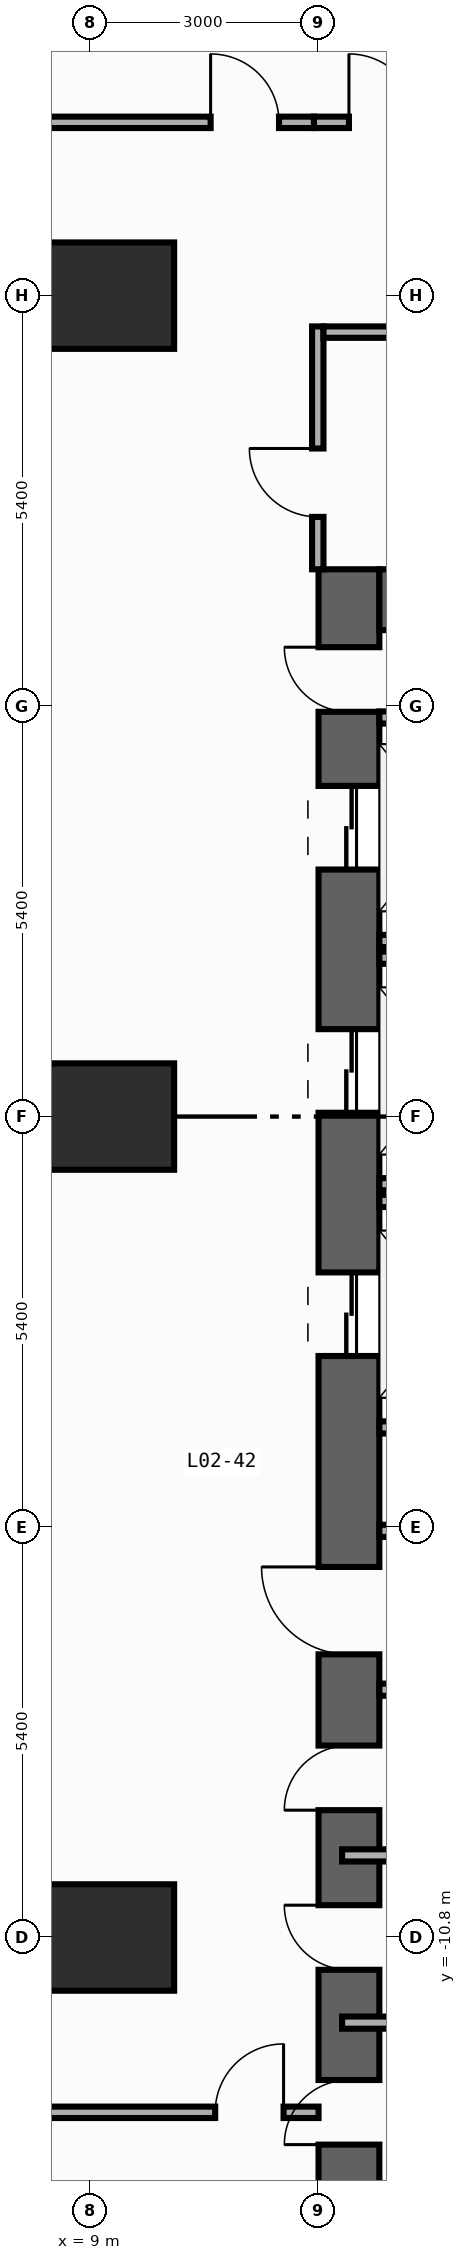
"""IFC4 building model, lengths in metres.
Left out: names, types, materials, properties, quantities, classifications, styles, units other than length and angle.
Written with IfcOpenShell. Run it as: python <this file> out.ifc"""

import sys

from ifc_helpers import new_model, si_unit, direction, frame, frame_2d, origin, origin_2d, place, context, subcontext, project, spatial, rectangle, extrude, element, fill, save


model = new_model("IFC4")
c1 = context("Model", 3, precision=1e-05, world=origin(), true_north=direction((0.0, 1.0)))
c2 = subcontext(c1, "Body", "Model", "MODEL_VIEW")
j1 = project(units=[si_unit("LENGTHUNIT", "METRE"), si_unit("PLANEANGLEUNIT", "RADIAN")], contexts=[c1])
p1 = place(None, origin())
s1 = spatial("IfcSite", under=j1, at=p1, CompositionType="ELEMENT")
p2 = place(p1, origin())
s2 = spatial("IfcBuilding", under=s1, at=p2, CompositionType="ELEMENT")
p3 = place(p2, frame((0.0, 0.0, 6.0)))
s3 = spatial("IfcBuildingStorey", under=s2, at=p3, CompositionType="ELEMENT", Elevation=6.0)
p4 = place(p3, frame((12.4, -19.8, 0.0), z_axis=(0.0, 0.0, 1.0), x_axis=(0.0, 1.0, 0.0)))
e1 = element("IfcWall", 1, at=p4, inside=s3, PredefinedType="SHEAR", context=c2, shape_type="SweptSolid", body=[
    extrude(rectangle(XDim=27.0, YDim=0.8, at=frame_2d((13.5, 0.0))), origin(), (0.0, 0.0, 1.0), 4.7),
])
p5 = place(p4, frame((23.05, 0.0, 0.0)))
e2 = element("IfcOpeningElement", 2, at=p5, cuts=e1, PredefinedType="OPENING", context=c2, shape_type="SweptSolid", body=[
    extrude(rectangle(XDim=1.1, YDim=2.2, at=frame_2d((0.55, 1.1))), frame((0.0, 0.41, 0.0), z_axis=(0.0, -1.0, 0.0), x_axis=(1.0, 0.0, 0.0)), (0.0, 0.0, 1.0), 0.82),
])
p6 = place(p4, frame((19.85, 0.0, 0.0)))
e3 = element("IfcOpeningElement", 3, at=p6, cuts=e1, PredefinedType="OPENING", context=c2, shape_type="SweptSolid", body=[
    extrude(rectangle(XDim=1.1, YDim=2.2, at=frame_2d((0.55, 1.1))), frame((0.0, 0.41, 0.0), z_axis=(0.0, -1.0, 0.0), x_axis=(1.0, 0.0, 0.0)), (0.0, 0.0, 1.0), 0.82),
])
p7 = place(p4, frame((16.65, 0.0, 0.0)))
e4 = element("IfcOpeningElement", 4, at=p7, cuts=e1, PredefinedType="OPENING", context=c2, shape_type="SweptSolid", body=[
    extrude(rectangle(XDim=1.1, YDim=2.2, at=frame_2d((0.55, 1.1))), frame((0.0, 0.41, 0.0), z_axis=(0.0, -1.0, 0.0), x_axis=(1.0, 0.0, 0.0)), (0.0, 0.0, 1.0), 0.82),
])
p8 = place(p4, frame((6.275, 0.0, 0.0)))
e5 = element("IfcOpeningElement", 5, at=p8, cuts=e1, PredefinedType="OPENING", context=c2, shape_type="SweptSolid", body=[
    extrude(rectangle(XDim=0.85, YDim=2.1, at=frame_2d((0.425, 1.05))), frame((0.0, 0.41, 0.0), z_axis=(0.0, -1.0, 0.0), x_axis=(1.0, 0.0, 0.0)), (0.0, 0.0, 1.0), 0.82),
])
p9 = place(p4, frame((8.575, 0.0, 0.0)))
e6 = element("IfcOpeningElement", 6, at=p9, cuts=e1, PredefinedType="OPENING", context=c2, shape_type="SweptSolid", body=[
    extrude(rectangle(XDim=0.85, YDim=2.1, at=frame_2d((0.425, 1.05))), frame((0.0, 0.41, 0.0), z_axis=(0.0, -1.0, 0.0), x_axis=(1.0, 0.0, 0.0)), (0.0, 0.0, 1.0), 0.82),
])
p10 = place(p4, frame((10.675, 0.0, 0.0)))
e7 = element("IfcOpeningElement", 7, at=p10, cuts=e1, PredefinedType="OPENING", context=c2, shape_type="SweptSolid", body=[
    extrude(rectangle(XDim=0.85, YDim=2.1, at=frame_2d((0.425, 1.05))), frame((0.0, 0.41, 0.0), z_axis=(0.0, -1.0, 0.0), x_axis=(1.0, 0.0, 0.0)), (0.0, 0.0, 1.0), 0.82),
])
p11 = place(p4, frame((12.725, 0.0, 0.0)))
e8 = element("IfcOpeningElement", 8, at=p11, cuts=e1, PredefinedType="OPENING", context=c2, shape_type="SweptSolid", body=[
    extrude(rectangle(XDim=1.15, YDim=2.2, at=frame_2d((0.575, 1.1))), frame((0.0, 0.41, 0.0), z_axis=(0.0, -1.0, 0.0), x_axis=(1.0, 0.0, 0.0)), (0.0, 0.0, 1.0), 0.82),
])
p12 = place(p4, frame((25.125, 0.0, 0.0)))
e9 = element("IfcOpeningElement", 9, at=p12, cuts=e1, PredefinedType="OPENING", context=c2, shape_type="SweptSolid", body=[
    extrude(rectangle(XDim=0.85, YDim=2.1, at=frame_2d((0.425, 1.05))), frame((0.0, 0.41, 0.0), z_axis=(0.0, -1.0, 0.0), x_axis=(1.0, 0.0, 0.0)), (0.0, 0.0, 1.0), 0.82),
])
p13 = place(p3, frame((12.8, 6.8, 0.0), z_axis=(0.0, 0.0, 1.0), x_axis=(1.0, 0.0, 0.0)))
e10 = element("IfcWall", 10, at=p13, inside=s3, PredefinedType="SHEAR", context=c2, shape_type="SweptSolid", body=[
    extrude(rectangle(XDim=6.8, YDim=0.8, at=frame_2d((3.4, 0.0))), origin(), (0.0, 0.0, 1.0), 4.7),
])
for number, where, z_axis, x_axis in (
    (11, (9.2, -10.8, 0.0), (0.0, 0.0, 1.0), (1.0, 0.0, 0.0)),
    (12, (9.2, 0.0, 0.0), (0.0, 0.0, 1.0), (1.0, 0.0, 0.0)),
    (13, (9.2, 10.8, 0.0), (0.0, 0.0, 1.0), (1.0, 0.0, 0.0)),
):
    element("IfcColumn", number, at=place(p3, frame(where, z_axis=z_axis, x_axis=x_axis)), inside=s3, PredefinedType="COLUMN", context=c2, shape_type="SweptSolid", body=[
        extrude(rectangle(XDim=1.8, YDim=1.4, at=origin_2d()), origin(), (0.0, 0.0, 1.0), 5.0),
    ])
for number, where, z_axis, x_axis in (
    (14, (12.8, 2.31, 0.0), (0.0, 0.0, 1.0), (1.0, 0.0, 0.0)),
    (15, (12.8, -0.89, 0.0), (0.0, 0.0, 1.0), (1.0, 0.0, 0.0)),
    (16, (12.8, 2.09, 0.0), (0.0, 0.0, 1.0), (1.0, 0.0, 0.0)),
    (17, (12.8, -4.09, 0.0), (0.0, 0.0, 1.0), (1.0, 0.0, 0.0)),
    (18, (12.8, -1.11, 0.0), (0.0, 0.0, 1.0), (1.0, 0.0, 0.0)),
):
    element("IfcWall", number, at=place(p3, frame(where, z_axis=z_axis, x_axis=x_axis)), inside=s3, PredefinedType="STANDARD", context=c2, shape_type="SweptSolid", body=[
        extrude(rectangle(XDim=2.19, YDim=0.16, at=frame_2d((1.095, 0.0))), origin(), (0.0, 0.0, 1.0), 4.7),
    ])
for number, where, z_axis, x_axis in (
    (19, (12.8, -5.45, 0.0), (0.0, 0.0, 1.0), (1.0, 0.0, 0.0)),
    (20, (12.8, -7.54, 0.0), (0.0, 0.0, 1.0), (1.0, 0.0, 0.0)),
    (21, (12.8, 5.25, 0.0), (0.0, 0.0, 1.0), (1.0, 0.0, 0.0)),
):
    element("IfcWall", number, at=place(p3, frame(where, z_axis=z_axis, x_axis=x_axis)), inside=s3, PredefinedType="STANDARD", context=c2, shape_type="SweptSolid", body=[
        extrude(rectangle(XDim=2.6, YDim=0.16, at=frame_2d((1.3, 0.0))), origin(), (0.0, 0.0, 1.0), 4.7),
    ])
for number, where, z_axis, x_axis in (
    (22, (12.31, -11.92, 0.0), (0.0, 0.0, 1.0), (1.0, 0.0, 0.0)),
    (23, (12.31, -9.72, 0.0), (0.0, 0.0, 1.0), (1.0, 0.0, 0.0)),
):
    element("IfcWall", number, at=place(p3, frame(where, z_axis=z_axis, x_axis=x_axis)), inside=s3, PredefinedType="PARTITIONING", context=c2, shape_type="SweptSolid", body=[
        extrude(rectangle(XDim=3.065, YDim=0.16, at=frame_2d((1.532, 0.0))), origin(), (0.0, 0.0, 1.0), 4.7),
    ])
p14 = place(p3, frame((11.99, 7.2, 0.0), z_axis=(0.0, 0.0, 1.0), x_axis=(0.0, 1.0, 0.0)))
e24 = element("IfcWall", 24, at=p14, inside=s3, PredefinedType="PARTITIONING", context=c2, shape_type="SweptSolid", body=[
    extrude(rectangle(XDim=3.195, YDim=0.15, at=frame_2d((1.598, 0.0))), origin(), (0.0, 0.0, 1.0), 4.7),
])
p15 = place(p14, frame((0.689, 0.0, 0.0)))
e25 = element("IfcOpeningElement", 25, at=p15, cuts=e24, PredefinedType="OPENING", context=c2, shape_type="SweptSolid", body=[
    extrude(rectangle(XDim=0.9, YDim=2.15, at=frame_2d((0.45, 1.075))), frame((0.0, 0.085, 0.0), z_axis=(0.0, -1.0, 0.0), x_axis=(1.0, 0.0, 0.0)), (0.0, 0.0, 1.0), 0.17),
])
p16 = place(p3, frame((8.205, 13.08, 0.0), z_axis=(0.0, 0.0, 1.0), x_axis=(1.0, 0.0, 0.0)))
e26 = element("IfcWall", 26, at=p16, inside=s3, PredefinedType="PARTITIONING", context=c2, shape_type="SweptSolid", body=[
    extrude(rectangle(XDim=3.735, YDim=0.15, at=frame_2d((1.867, 0.0))), origin(), (0.0, 0.0, 1.0), 4.7),
])
p17 = place(p16, frame((2.375, 0.0, 0.0)))
e27 = element("IfcOpeningElement", 27, at=p17, cuts=e26, PredefinedType="OPENING", context=c2, shape_type="SweptSolid", body=[
    extrude(rectangle(XDim=0.9, YDim=2.15, at=frame_2d((0.45, 1.075))), frame((0.0, 0.085, 0.0), z_axis=(0.0, -1.0, 0.0), x_axis=(1.0, 0.0, 0.0)), (0.0, 0.0, 1.0), 0.17),
])
p18 = place(p3, frame((8.205, -13.1, 0.0), z_axis=(0.0, 0.0, 1.0), x_axis=(1.0, 0.0, 0.0)))
e28 = element("IfcWall", 28, at=p18, inside=s3, PredefinedType="PARTITIONING", context=c2, shape_type="SweptSolid", body=[
    extrude(rectangle(XDim=3.795, YDim=0.15, at=frame_2d((1.897, 0.0))), origin(), (0.0, 0.0, 1.0), 4.7),
])
p19 = place(p18, frame((2.435, 0.0, 0.0)))
e29 = element("IfcOpeningElement", 29, at=p19, cuts=e28, PredefinedType="OPENING", context=c2, shape_type="SweptSolid", body=[
    extrude(rectangle(XDim=0.9, YDim=2.15, at=frame_2d((0.45, 1.075))), frame((0.0, 0.085, 0.0), z_axis=(0.0, -1.0, 0.0), x_axis=(1.0, 0.0, 0.0)), (0.0, 0.0, 1.0), 0.17),
])
p20 = place(p3, frame((12.065, 10.32, 0.0), z_axis=(0.0, 0.0, 1.0), x_axis=(1.0, 0.0, 0.0)))
e30 = element("IfcWall", 30, at=p20, inside=s3, PredefinedType="PARTITIONING", context=c2, shape_type="SweptSolid", body=[
    extrude(rectangle(XDim=8.41, YDim=0.15, at=frame_2d((4.205, 0.0))), origin(), (0.0, 0.0, 1.0), 4.7),
])
p21 = place(p20, frame((4.785, 0.0, 0.0)))
e31 = element("IfcOpeningElement", 31, at=p21, cuts=e30, PredefinedType="OPENING", context=c2, shape_type="SweptSolid", body=[
    extrude(rectangle(XDim=0.9, YDim=2.15, at=frame_2d((0.45, 1.075))), frame((0.0, 0.085, 0.0), z_axis=(0.0, -1.0, 0.0), x_axis=(1.0, 0.0, 0.0)), (0.0, 0.0, 1.0), 0.17),
])
p22 = place(p3, frame((11.94, 13.08, 0.0), z_axis=(0.0, 0.0, 1.0), x_axis=(1.0, 0.0, 0.0)))
e32 = element("IfcWall", 32, at=p22, inside=s3, PredefinedType="PARTITIONING", context=c2, shape_type="SweptSolid", body=[
    extrude(rectangle(XDim=2.34, YDim=0.15, at=frame_2d((1.17, 0.0))), origin(), (0.0, 0.0, 1.0), 4.7),
])
p23 = place(p22, frame((0.46, 0.0, 0.0)))
e33 = element("IfcOpeningElement", 33, at=p23, cuts=e32, PredefinedType="OPENING", context=c2, shape_type="SweptSolid", body=[
    extrude(rectangle(XDim=0.9, YDim=2.15, at=frame_2d((0.45, 1.075))), frame((0.0, 0.085, 0.0), z_axis=(0.0, -1.0, 0.0), x_axis=(1.0, 0.0, 0.0)), (0.0, 0.0, 1.0), 0.17),
])
p24 = place(p5, origin())
e34 = element("IfcDoor", 34, at=p24, inside=s3, OperationType="DOUBLE_DOOR_SLIDING", PredefinedType="DOOR", context=c2, shape_type="SweptSolid", body=[
    extrude(rectangle(XDim=1.1, YDim=2.2, at=frame_2d((0.55, 1.1))), frame((0.0, 0.025, 0.0), z_axis=(0.0, -1.0, 0.0), x_axis=(1.0, 0.0, 0.0)), (0.0, 0.0, 1.0), 0.05),
])
fill(e2, e34)
p25 = place(p6, origin())
e35 = element("IfcDoor", 35, at=p25, inside=s3, OperationType="DOUBLE_DOOR_SLIDING", PredefinedType="DOOR", context=c2, shape_type="SweptSolid", body=[
    extrude(rectangle(XDim=1.1, YDim=2.2, at=frame_2d((0.55, 1.1))), frame((0.0, 0.025, 0.0), z_axis=(0.0, -1.0, 0.0), x_axis=(1.0, 0.0, 0.0)), (0.0, 0.0, 1.0), 0.05),
])
fill(e3, e35)
p26 = place(p7, origin())
e36 = element("IfcDoor", 36, at=p26, inside=s3, OperationType="DOUBLE_DOOR_SLIDING", PredefinedType="DOOR", context=c2, shape_type="SweptSolid", body=[
    extrude(rectangle(XDim=1.1, YDim=2.2, at=frame_2d((0.55, 1.1))), frame((0.0, 0.025, 0.0), z_axis=(0.0, -1.0, 0.0), x_axis=(1.0, 0.0, 0.0)), (0.0, 0.0, 1.0), 0.05),
])
fill(e4, e36)
p27 = place(p8, origin())
e37 = element("IfcDoor", 37, at=p27, inside=s3, OperationType="SINGLE_SWING_LEFT", PredefinedType="DOOR", context=c2, shape_type="SweptSolid", body=[
    extrude(rectangle(XDim=0.85, YDim=2.1, at=frame_2d((0.425, 1.05))), frame((0.0, 0.025, 0.0), z_axis=(0.0, -1.0, 0.0), x_axis=(1.0, 0.0, 0.0)), (0.0, 0.0, 1.0), 0.05),
])
fill(e5, e37)
p28 = place(p9, origin())
e38 = element("IfcDoor", 38, at=p28, inside=s3, OperationType="SINGLE_SWING_RIGHT", PredefinedType="DOOR", context=c2, shape_type="SweptSolid", body=[
    extrude(rectangle(XDim=0.85, YDim=2.1, at=frame_2d((0.425, 1.05))), frame((0.0, 0.025, 0.0), z_axis=(0.0, -1.0, 0.0), x_axis=(1.0, 0.0, 0.0)), (0.0, 0.0, 1.0), 0.05),
])
fill(e6, e38)
p29 = place(p10, origin())
e39 = element("IfcDoor", 39, at=p29, inside=s3, OperationType="SINGLE_SWING_LEFT", PredefinedType="DOOR", context=c2, shape_type="SweptSolid", body=[
    extrude(rectangle(XDim=0.85, YDim=2.1, at=frame_2d((0.425, 1.05))), frame((0.0, 0.025, 0.0), z_axis=(0.0, -1.0, 0.0), x_axis=(1.0, 0.0, 0.0)), (0.0, 0.0, 1.0), 0.05),
])
fill(e7, e39)
p30 = place(p11, origin())
e40 = element("IfcDoor", 40, at=p30, inside=s3, OperationType="SINGLE_SWING_RIGHT", PredefinedType="DOOR", context=c2, shape_type="SweptSolid", body=[
    extrude(rectangle(XDim=1.15, YDim=2.2, at=frame_2d((0.575, 1.1))), frame((0.0, 0.025, 0.0), z_axis=(0.0, -1.0, 0.0), x_axis=(1.0, 0.0, 0.0)), (0.0, 0.0, 1.0), 0.05),
])
fill(e8, e40)
p31 = place(p12, origin())
e41 = element("IfcDoor", 41, at=p31, inside=s3, OperationType="SINGLE_SWING_RIGHT", PredefinedType="DOOR", context=c2, shape_type="SweptSolid", body=[
    extrude(rectangle(XDim=0.85, YDim=2.1, at=frame_2d((0.425, 1.05))), frame((0.0, 0.025, 0.0), z_axis=(0.0, -1.0, 0.0), x_axis=(1.0, 0.0, 0.0)), (0.0, 0.0, 1.0), 0.05),
])
fill(e9, e41)
p32 = place(p15, origin())
e42 = element("IfcDoor", 42, at=p32, inside=s3, OperationType="SINGLE_SWING_RIGHT", PredefinedType="DOOR", context=c2, shape_type="SweptSolid", body=[
    extrude(rectangle(XDim=0.9, YDim=2.15, at=frame_2d((0.45, 1.075))), frame((0.0, 0.025, 0.0), z_axis=(0.0, -1.0, 0.0), x_axis=(1.0, 0.0, 0.0)), (0.0, 0.0, 1.0), 0.05),
])
fill(e25, e42)
p33 = place(p17, origin())
e43 = element("IfcDoor", 43, at=p33, inside=s3, OperationType="SINGLE_SWING_LEFT", PredefinedType="DOOR", context=c2, shape_type="SweptSolid", body=[
    extrude(rectangle(XDim=0.9, YDim=2.15, at=frame_2d((0.45, 1.075))), frame((0.0, 0.025, 0.0), z_axis=(0.0, -1.0, 0.0), x_axis=(1.0, 0.0, 0.0)), (0.0, 0.0, 1.0), 0.05),
])
fill(e27, e43)
p34 = place(p19, origin())
e44 = element("IfcDoor", 44, at=p34, inside=s3, OperationType="SINGLE_SWING_RIGHT", PredefinedType="DOOR", context=c2, shape_type="SweptSolid", body=[
    extrude(rectangle(XDim=0.9, YDim=2.15, at=frame_2d((0.45, 1.075))), frame((0.0, 0.025, 0.0), z_axis=(0.0, -1.0, 0.0), x_axis=(1.0, 0.0, 0.0)), (0.0, 0.0, 1.0), 0.05),
])
fill(e29, e44)
p35 = place(p23, origin())
e45 = element("IfcDoor", 45, at=p35, inside=s3, OperationType="SINGLE_SWING_LEFT", PredefinedType="DOOR", context=c2, shape_type="SweptSolid", body=[
    extrude(rectangle(XDim=0.9, YDim=2.15, at=frame_2d((0.45, 1.075))), frame((0.0, 0.025, 0.0), z_axis=(0.0, -1.0, 0.0), x_axis=(1.0, 0.0, 0.0)), (0.0, 0.0, 1.0), 0.05),
])
fill(e33, e45)
save(model, sys.argv[1])
